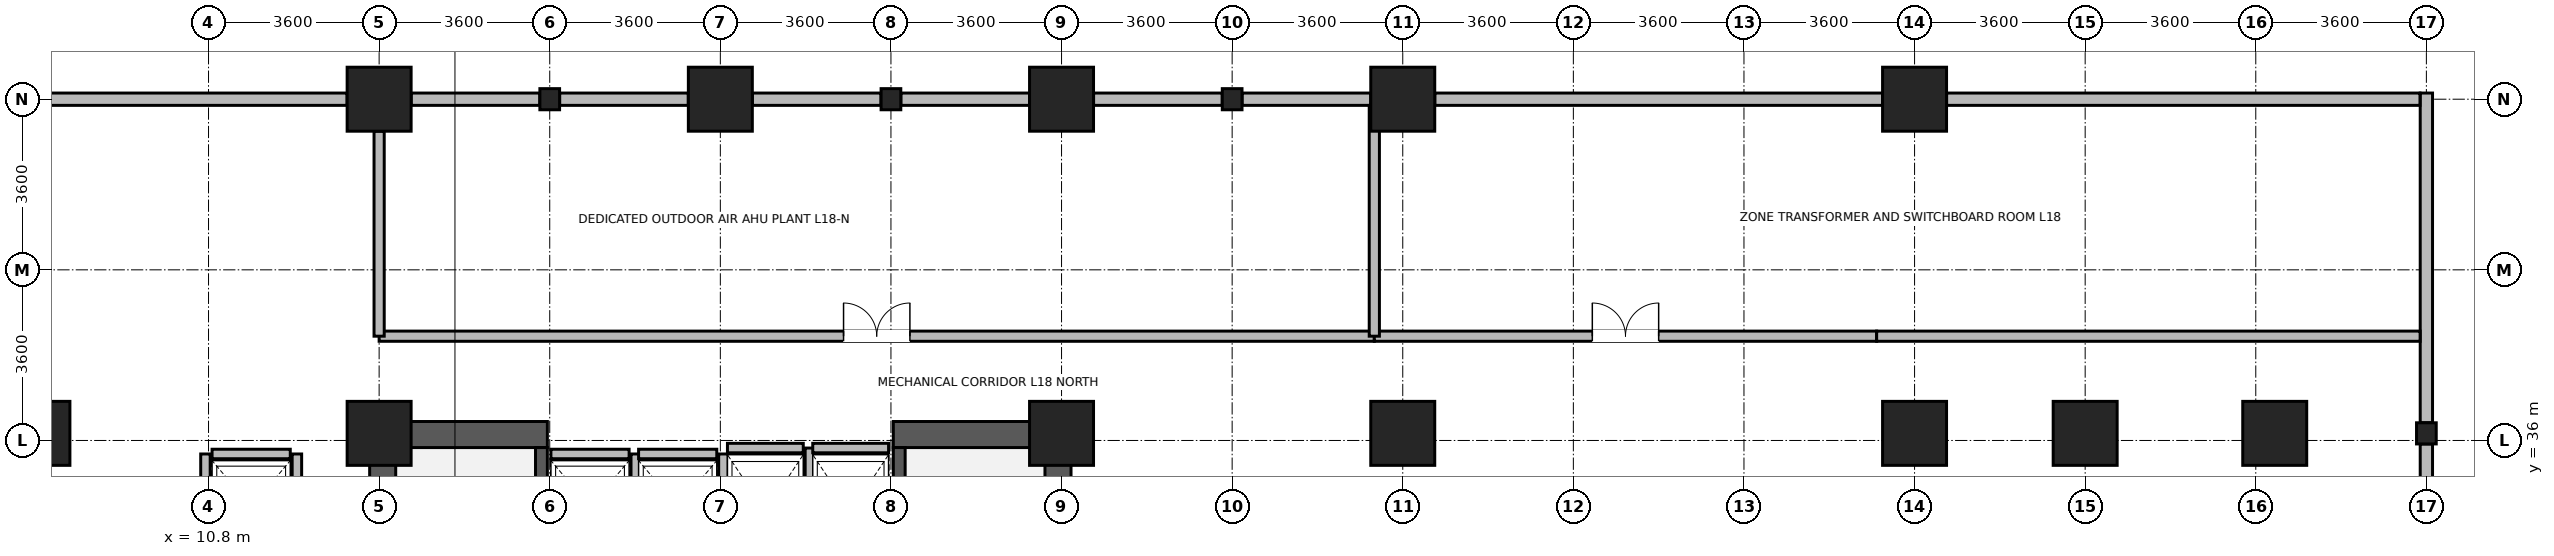
"""IFC4 building model, lengths in metres.
Left out: names, types, materials, properties, quantities, classifications, styles, units other than length and angle.
Written with IfcOpenShell. Run it as: python <this file> out.ifc"""

import sys

from ifc_helpers import new_model, si_unit, direction, frame, frame_2d, origin, origin_2d, place, context, subcontext, project, spatial, rectangle, i_section, extrude, source, transform, mapped, element, fill, save


model = new_model("IFC4")
c1 = context("Model", 3, precision=1e-05, world=origin(), true_north=direction((0.0, 1.0)))
c2 = subcontext(c1, "Body", "Model", "MODEL_VIEW")
j1 = project(units=[si_unit("LENGTHUNIT", "METRE"), si_unit("PLANEANGLEUNIT", "RADIAN")], contexts=[c1])
p1 = place(None, origin())
s1 = spatial("IfcSite", under=j1, at=p1, CompositionType="ELEMENT")
p2 = place(p1, origin())
s2 = spatial("IfcBuilding", under=s1, at=p2, CompositionType="ELEMENT")
p3 = place(p2, frame((0.0, 0.0, 73.4)))
s3 = spatial("IfcBuildingStorey", under=s2, at=p3, CompositionType="ELEMENT", Elevation=73.4)
for number, where, z_axis, x_axis in (
    (1, (14.475, 28.3, 0.0), (0.0, 0.0, 1.0), (0.0, 1.0, 0.0)),
    (2, (28.725, 28.3, 0.0), (0.0, 0.0, 1.0), (0.0, 1.0, 0.0)),
):
    element("IfcWall", number, at=place(p3, frame(where, z_axis=z_axis, x_axis=x_axis)), inside=s3, PredefinedType="SHEAR", context=c2, shape_type="SweptSolid", body=[
        extrude(rectangle(XDim=8.1, YDim=0.55, at=frame_2d((4.05, 0.0))), origin(), (0.0, 0.0, 1.0), 4.78),
    ])
for number, where, z_axis, x_axis in (
    (3, (14.75, 36.125, 0.0), (0.0, 0.0, 1.0), (1.0, 0.0, 0.0)),
    (4, (25.25, 36.125, 0.0), (0.0, 0.0, 1.0), (1.0, 0.0, 0.0)),
):
    element("IfcWall", number, at=place(p3, frame(where, z_axis=z_axis, x_axis=x_axis)), inside=s3, PredefinedType="SHEAR", context=c2, shape_type="SweptSolid", body=[
        extrude(rectangle(XDim=3.2, YDim=0.55, at=frame_2d((1.6, 0.0))), origin(), (0.0, 0.0, 1.0), 4.78),
    ])
p4 = place(p3, frame((17.825, 28.85, 0.0), z_axis=(0.0, 0.0, 1.0), x_axis=(0.0, 1.0, 0.0)))
e5 = element("IfcWall", 5, at=p4, inside=s3, PredefinedType="SHEAR", context=c2, shape_type="SweptSolid", body=[
    extrude(rectangle(XDim=7.0, YDim=0.25, at=frame_2d((3.5, 0.0))), origin(), (0.0, 0.0, 1.0), 4.78),
])
p5 = place(p4, frame((0.15, 0.0, 0.0)))
e6 = element("IfcOpeningElement", 6, at=p5, cuts=e5, PredefinedType="OPENING", context=c2, shape_type="SweptSolid", body=[
    extrude(rectangle(XDim=1.1, YDim=2.08, at=frame_2d((0.55, 1.04))), frame((0.0, 0.135, 0.0), z_axis=(0.0, -1.0, 0.0), x_axis=(1.0, 0.0, 0.0)), (0.0, 0.0, 1.0), 0.27),
])
p6 = place(p3, frame((25.375, 28.85, 0.0), z_axis=(0.0, 0.0, 1.0), x_axis=(0.0, 1.0, 0.0)))
e7 = element("IfcWall", 7, at=p6, inside=s3, PredefinedType="SHEAR", context=c2, shape_type="SweptSolid", body=[
    extrude(rectangle(XDim=7.0, YDim=0.25, at=frame_2d((3.5, 0.0))), origin(), (0.0, 0.0, 1.0), 4.78),
])
p7 = place(p6, frame((0.15, 0.0, 0.0)))
e8 = element("IfcOpeningElement", 8, at=p7, cuts=e7, PredefinedType="OPENING", context=c2, shape_type="SweptSolid", body=[
    extrude(rectangle(XDim=1.1, YDim=2.08, at=frame_2d((0.55, 1.04))), frame((0.0, 0.135, 0.0), z_axis=(0.0, -1.0, 0.0), x_axis=(1.0, 0.0, 0.0)), (0.0, 0.0, 1.0), 0.27),
])
m1 = source(origin(), c2, "Body", "SweptSolid", [
    extrude(rectangle(XDim=1.35, YDim=1.35, at=origin_2d()), origin(), (0.0, 0.0, 1.0), 5.2),
])
for number, where, z_axis, x_axis in (
    (9, (7.2, 36.15, 0.0), (0.0, 0.0, 1.0), (1.0, 0.0, 0.0)),
    (10, (14.4, 36.15, 0.0), (0.0, 0.0, 1.0), (1.0, 0.0, 0.0)),
    (11, (14.4, 43.2, 0.0), (0.0, 0.0, 1.0), (1.0, 0.0, 0.0)),
    (12, (21.6, 43.2, 0.0), (0.0, 0.0, 1.0), (1.0, 0.0, 0.0)),
    (13, (28.8, 36.15, 0.0), (0.0, 0.0, 1.0), (1.0, 0.0, 0.0)),
    (14, (28.8, 43.2, 0.0), (0.0, 0.0, 1.0), (1.0, 0.0, 0.0)),
    (15, (36.0, 43.2, 0.0), (0.0, 0.0, 1.0), (1.0, 0.0, 0.0)),
    (16, (36.0, 36.15, 0.0), (0.0, 0.0, 1.0), (1.0, 0.0, 0.0)),
    (17, (46.8, 36.15, 0.0), (0.0, 0.0, 1.0), (1.0, 0.0, 0.0)),
    (18, (46.8, 43.2, 0.0), (0.0, 0.0, 1.0), (1.0, 0.0, 0.0)),
    (19, (50.4, 36.15, 0.0), (0.0, 0.0, 1.0), (1.0, 0.0, 0.0)),
    (20, (54.4, 36.15, 0.0), (0.0, 0.0, 1.0), (1.0, 0.0, 0.0)),
):
    element("IfcColumn", number, at=place(p3, frame(where, z_axis=z_axis, x_axis=x_axis)), inside=s3, PredefinedType="COLUMN", context=c2, shape_type="MappedRepresentation", body=[
        mapped(m1, transform((0.0, 0.0, 0.0), x_axis=(1.0, 0.0, 0.0), y_axis=(0.0, 1.0, 0.0), z_axis=(0.0, 0.0, 1.0), scale=1.0)),
    ])
m2 = source(origin(), c2, "Body", "SweptSolid", [
    extrude(i_section(OverallWidth=0.416, OverallDepth=0.446, WebThickness=0.029, FlangeThickness=0.04, FilletRadius=0.015, at=origin_2d()), origin(), (0.0, 0.0, 1.0), 5.2),
])
for number, where, z_axis, x_axis in (
    (21, (18.0, 43.2, 0.0), (0.0, 0.0, 1.0), (1.0, 0.0, 0.0)),
    (22, (25.2, 43.2, 0.0), (0.0, 0.0, 1.0), (1.0, 0.0, 0.0)),
    (23, (32.4, 43.2, 0.0), (0.0, 0.0, 1.0), (1.0, 0.0, 0.0)),
    (24, (57.6, 36.15, 0.0), (0.0, 0.0, 1.0), (1.0, 0.0, 0.0)),
):
    element("IfcColumn", number, at=place(p3, frame(where, z_axis=z_axis, x_axis=x_axis)), inside=s3, PredefinedType="COLUMN", context=c2, shape_type="MappedRepresentation", body=[
        mapped(m2, transform((0.0, 0.0, 0.0), x_axis=(1.0, 0.0, 0.0), y_axis=(0.0, 1.0, 0.0), z_axis=(0.0, 0.0, 1.0), scale=1.0)),
    ])
p8 = place(p3, frame((57.6, 35.926, 0.0), z_axis=(0.0, 0.0, 1.0), x_axis=(0.0, -1.0, 0.0)))
e25 = element("IfcWall", 25, at=p8, inside=s3, PredefinedType="STANDARD", context=c2, shape_type="SweptSolid", body=[
    extrude(rectangle(XDim=7.052, YDim=0.26, at=frame_2d((3.526, 0.0))), origin(), (0.0, 0.0, 1.0), 4.76),
])
p9 = place(p3, frame((57.6, 43.33, 0.0), z_axis=(0.0, 0.0, 1.0), x_axis=(0.0, -1.0, 0.0)))
e26 = element("IfcWall", 26, at=p9, inside=s3, PredefinedType="STANDARD", context=c2, shape_type="SweptSolid", body=[
    extrude(rectangle(XDim=6.956, YDim=0.26, at=frame_2d((3.478, 0.0))), origin(), (0.0, 0.0, 1.0), 4.76),
])
p10 = place(p3, frame((47.476, 43.2, 0.0), z_axis=(0.0, 0.0, 1.0), x_axis=(1.0, 0.0, 0.0)))
e27 = element("IfcWall", 27, at=p10, inside=s3, PredefinedType="STANDARD", context=c2, shape_type="SweptSolid", body=[
    extrude(rectangle(XDim=9.989, YDim=0.26, at=frame_2d((4.995, 0.0))), origin(), (0.0, 0.0, 1.0), 4.76),
])
p11 = place(p3, frame((36.676, 43.2, 0.0), z_axis=(0.0, 0.0, 1.0), x_axis=(1.0, 0.0, 0.0)))
e28 = element("IfcWall", 28, at=p11, inside=s3, PredefinedType="STANDARD", context=c2, shape_type="SweptSolid", body=[
    extrude(rectangle(XDim=9.448, YDim=0.26, at=frame_2d((4.724, 0.0))), origin(), (0.0, 0.0, 1.0), 2.96),
])
p12 = place(p3, frame((32.609, 43.2, 0.0), z_axis=(0.0, 0.0, 1.0), x_axis=(1.0, 0.0, 0.0)))
e29 = element("IfcWall", 29, at=p12, inside=s3, PredefinedType="STANDARD", context=c2, shape_type="SweptSolid", body=[
    extrude(rectangle(XDim=2.715, YDim=0.26, at=frame_2d((1.357, 0.0))), origin(), (0.0, 0.0, 1.0), 2.96),
])
p13 = place(p3, frame((29.476, 43.2, 0.0), z_axis=(0.0, 0.0, 1.0), x_axis=(1.0, 0.0, 0.0)))
e30 = element("IfcWall", 30, at=p13, inside=s3, PredefinedType="STANDARD", context=c2, shape_type="SweptSolid", body=[
    extrude(rectangle(XDim=2.715, YDim=0.26, at=frame_2d((1.357, 0.0))), origin(), (0.0, 0.0, 1.0), 2.96),
])
for number, where, z_axis, x_axis in (
    (31, (25.409, 43.2, 0.0), (0.0, 0.0, 1.0), (1.0, 0.0, 0.0)),
    (32, (22.276, 43.2, 0.0), (0.0, 0.0, 1.0), (1.0, 0.0, 0.0)),
    (33, (18.209, 43.2, 0.0), (0.0, 0.0, 1.0), (1.0, 0.0, 0.0)),
    (34, (15.076, 43.2, 0.0), (0.0, 0.0, 1.0), (1.0, 0.0, 0.0)),
):
    element("IfcWall", number, at=place(p3, frame(where, z_axis=z_axis, x_axis=x_axis)), inside=s3, PredefinedType="STANDARD", context=c2, shape_type="SweptSolid", body=[
        extrude(rectangle(XDim=2.715, YDim=0.26, at=frame_2d((1.357, 0.0))), origin(), (0.0, 0.0, 1.0), 2.96),
    ])
p14 = place(p3, frame((3.735, 43.2, 0.0), z_axis=(0.0, 0.0, 1.0), x_axis=(1.0, 0.0, 0.0)))
e35 = element("IfcWall", 35, at=p14, inside=s3, PredefinedType="STANDARD", context=c2, shape_type="SweptSolid", body=[
    extrude(rectangle(XDim=9.989, YDim=0.26, at=frame_2d((4.995, 0.0))), origin(), (0.0, 0.0, 1.0), 4.76),
])
p15 = place(p3, frame((18.025, 35.715, 0.0), z_axis=(0.0, 0.0, 1.0), x_axis=(1.0, 0.0, 0.0)))
e36 = element("IfcWall", 36, at=p15, inside=s3, PredefinedType="PARTITIONING", context=c2, shape_type="SweptSolid", body=[
    extrude(rectangle(XDim=1.65, YDim=0.2, at=frame_2d((0.825, 0.0))), origin(), (0.0, 0.0, 1.0), 3.56),
])
p16 = place(p3, frame((19.815, 33.485, 0.0), z_axis=(0.0, 0.0, 1.0), x_axis=(0.0, 1.0, 0.0)))
e37 = element("IfcWall", 37, at=p16, inside=s3, PredefinedType="PARTITIONING", context=c2, shape_type="SweptSolid", body=[
    extrude(rectangle(XDim=2.23, YDim=0.2, at=frame_2d((1.115, 0.0))), origin(), (0.0, 0.0, 1.0), 4.76),
])
p17 = place(p3, frame((19.875, 35.715, 0.0), z_axis=(0.0, 0.0, 1.0), x_axis=(1.0, 0.0, 0.0)))
e38 = element("IfcWall", 38, at=p17, inside=s3, PredefinedType="PARTITIONING", context=c2, shape_type="SweptSolid", body=[
    extrude(rectangle(XDim=1.65, YDim=0.2, at=frame_2d((0.825, 0.0))), origin(), (0.0, 0.0, 1.0), 3.56),
])
p18 = place(p3, frame((21.665, 33.485, 0.0), z_axis=(0.0, 0.0, 1.0), x_axis=(0.0, 1.0, 0.0)))
e39 = element("IfcWall", 39, at=p18, inside=s3, PredefinedType="PARTITIONING", context=c2, shape_type="SweptSolid", body=[
    extrude(rectangle(XDim=2.23, YDim=0.2, at=frame_2d((1.115, 0.0))), origin(), (0.0, 0.0, 1.0), 4.76),
])
p19 = place(p3, frame((10.875, 35.715, 0.0), z_axis=(0.0, 0.0, 1.0), x_axis=(1.0, 0.0, 0.0)))
e40 = element("IfcWall", 40, at=p19, inside=s3, PredefinedType="PARTITIONING", context=c2, shape_type="SweptSolid", body=[
    extrude(rectangle(XDim=1.65, YDim=0.2, at=frame_2d((0.825, 0.0))), origin(), (0.0, 0.0, 1.0), 4.76),
])
for number, where, z_axis, x_axis in (
    (41, (10.735, 33.485, 0.0), (0.0, 0.0, 1.0), (0.0, 1.0, 0.0)),
    (42, (12.665, 33.485, 0.0), (0.0, 0.0, 1.0), (0.0, 1.0, 0.0)),
):
    element("IfcWall", number, at=place(p3, frame(where, z_axis=z_axis, x_axis=x_axis)), inside=s3, PredefinedType="PARTITIONING", context=c2, shape_type="SweptSolid", body=[
        extrude(rectangle(XDim=2.23, YDim=0.2, at=frame_2d((1.115, 0.0))), origin(), (0.0, 0.0, 1.0), 4.76),
    ])
p20 = place(p3, frame((21.75, 35.84, 0.0), z_axis=(0.0, 0.0, 1.0), x_axis=(1.0, 0.0, 0.0)))
e43 = element("IfcWall", 43, at=p20, inside=s3, PredefinedType="PARTITIONING", context=c2, shape_type="SweptSolid", body=[
    extrude(rectangle(XDim=1.6, YDim=0.2, at=frame_2d((0.8, 0.0))), origin(), (0.0, 0.0, 1.0), 3.56),
])
p21 = place(p3, frame((23.49, 33.16, 0.0), z_axis=(0.0, 0.0, 1.0), x_axis=(0.0, 1.0, 0.0)))
e44 = element("IfcWall", 44, at=p21, inside=s3, PredefinedType="PARTITIONING", context=c2, shape_type="SweptSolid", body=[
    extrude(rectangle(XDim=2.68, YDim=0.2, at=frame_2d((1.34, 0.0))), origin(), (0.0, 0.0, 1.0), 4.76),
])
p22 = place(p3, frame((23.55, 35.84, 0.0), z_axis=(0.0, 0.0, 1.0), x_axis=(1.0, 0.0, 0.0)))
e45 = element("IfcWall", 45, at=p22, inside=s3, PredefinedType="PARTITIONING", context=c2, shape_type="SweptSolid", body=[
    extrude(rectangle(XDim=1.6, YDim=0.2, at=frame_2d((0.8, 0.0))), origin(), (0.0, 0.0, 1.0), 3.56),
])
p23 = place(p3, frame((14.4, 38.2, 0.0), z_axis=(0.0, 0.0, 1.0), x_axis=(1.0, 0.0, 0.0)))
e46 = element("IfcWall", 46, at=p23, inside=s3, PredefinedType="PARTITIONING", context=c2, shape_type="SweptSolid", body=[
    extrude(rectangle(XDim=21.0, YDim=0.215, at=frame_2d((10.5, 0.0))), origin(), (0.0, 0.0, 1.0), 4.76),
])
p24 = place(p23, frame((9.8, 0.0, 0.0)))
e47 = element("IfcOpeningElement", 47, at=p24, cuts=e46, PredefinedType="OPENING", context=c2, shape_type="SweptSolid", body=[
    extrude(rectangle(XDim=1.4, YDim=2.15, at=frame_2d((0.7, 1.075))), frame((0.0, 0.118, 0.0), z_axis=(0.0, -1.0, 0.0), x_axis=(1.0, 0.0, 0.0)), (0.0, 0.0, 1.0), 0.235),
])
p25 = place(p3, frame((35.4, 38.2, 0.0), z_axis=(0.0, 0.0, 1.0), x_axis=(1.0, 0.0, 0.0)))
e48 = element("IfcWall", 48, at=p25, inside=s3, PredefinedType="PARTITIONING", context=c2, shape_type="SweptSolid", body=[
    extrude(rectangle(XDim=10.6, YDim=0.215, at=frame_2d((5.3, 0.0))), origin(), (0.0, 0.0, 1.0), 4.76),
])
p26 = place(p25, frame((4.6, 0.0, 0.0)))
e49 = element("IfcOpeningElement", 49, at=p26, cuts=e48, PredefinedType="OPENING", context=c2, shape_type="SweptSolid", body=[
    extrude(rectangle(XDim=1.4, YDim=2.15, at=frame_2d((0.7, 1.075))), frame((0.0, 0.118, 0.0), z_axis=(0.0, -1.0, 0.0), x_axis=(1.0, 0.0, 0.0)), (0.0, 0.0, 1.0), 0.235),
])
p27 = place(p3, frame((46.0, 38.2, 0.0), z_axis=(0.0, 0.0, 1.0), x_axis=(1.0, 0.0, 0.0)))
e50 = element("IfcWall", 50, at=p27, inside=s3, PredefinedType="PARTITIONING", context=c2, shape_type="SweptSolid", body=[
    extrude(rectangle(XDim=11.468, YDim=0.215, at=frame_2d((5.734, 0.0))), origin(), (0.0, 0.0, 1.0), 4.76),
])
p28 = place(p3, frame((14.4, 38.2, 0.0), z_axis=(0.0, 0.0, 1.0), x_axis=(0.0, 1.0, 0.0)))
e51 = element("IfcWall", 51, at=p28, inside=s3, PredefinedType="PARTITIONING", context=c2, shape_type="SweptSolid", body=[
    extrude(rectangle(XDim=4.325, YDim=0.215, at=frame_2d((2.163, 0.0))), origin(), (0.0, 0.0, 1.0), 4.76),
])
p29 = place(p3, frame((35.4, 38.2, 0.0), z_axis=(0.0, 0.0, 1.0), x_axis=(0.0, 1.0, 0.0)))
e52 = element("IfcWall", 52, at=p29, inside=s3, PredefinedType="PARTITIONING", context=c2, shape_type="SweptSolid", body=[
    extrude(rectangle(XDim=4.868, YDim=0.215, at=frame_2d((2.434, 0.0))), origin(), (0.0, 0.0, 1.0), 4.76),
])
p30 = place(p24, origin())
e53 = element("IfcDoor", 53, at=p30, inside=s3, OperationType="DOUBLE_DOOR_SINGLE_SWING", PredefinedType="DOOR", context=c2, shape_type="SweptSolid", body=[
    extrude(rectangle(XDim=1.4, YDim=2.15, at=frame_2d((0.7, 1.075))), frame((0.0, 0.025, 0.0), z_axis=(0.0, -1.0, 0.0), x_axis=(1.0, 0.0, 0.0)), (0.0, 0.0, 1.0), 0.05),
])
fill(e47, e53)
p31 = place(p26, origin())
e54 = element("IfcDoor", 54, at=p31, inside=s3, OperationType="DOUBLE_DOOR_SINGLE_SWING", PredefinedType="DOOR", context=c2, shape_type="SweptSolid", body=[
    extrude(rectangle(XDim=1.4, YDim=2.15, at=frame_2d((0.7, 1.075))), frame((0.0, 0.025, 0.0), z_axis=(0.0, -1.0, 0.0), x_axis=(1.0, 0.0, 0.0)), (0.0, 0.0, 1.0), 0.05),
])
fill(e49, e54)
save(model, sys.argv[1])
